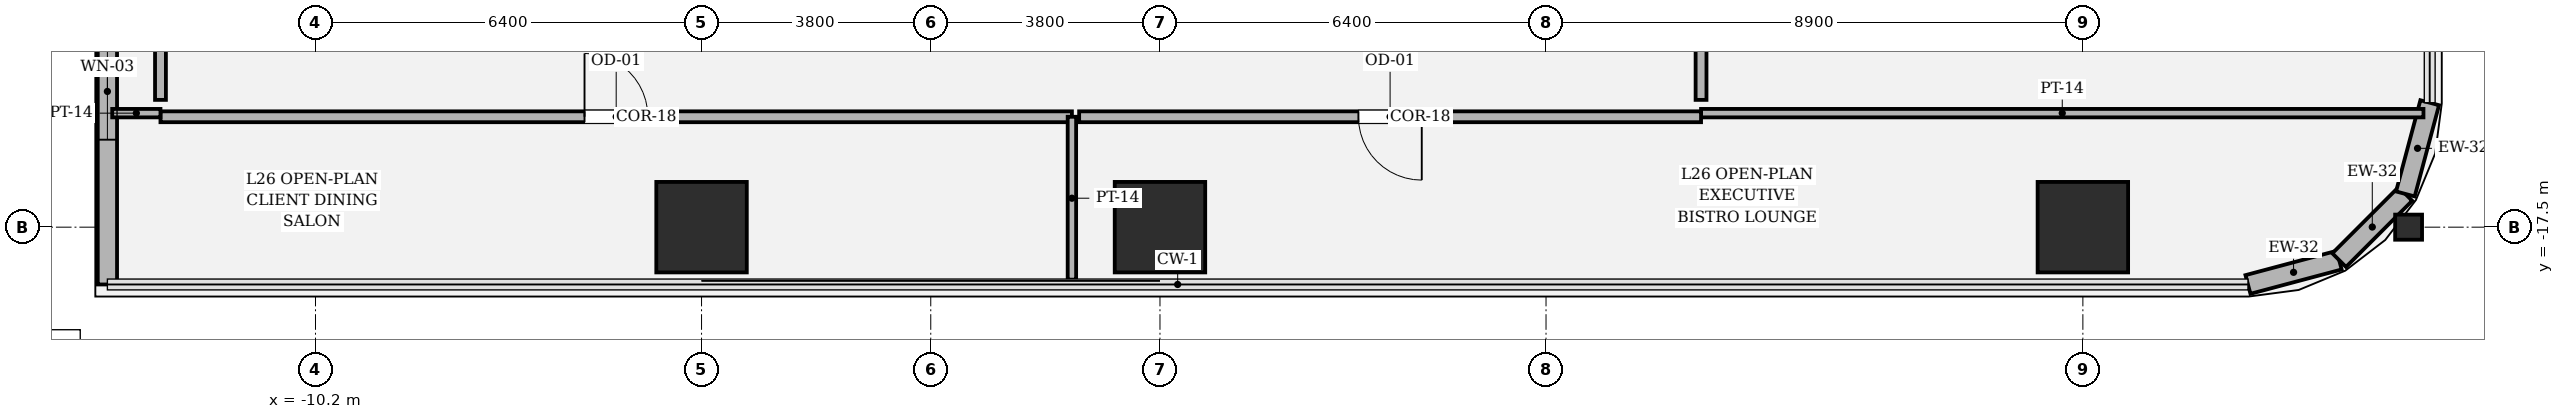
"""IFC4 building model, lengths in metres.
Left out: names, types, materials, properties, quantities, classifications, styles, units other than length and angle.
Written with IfcOpenShell. Run it as: python <this file> out.ifc"""

import sys

from ifc_helpers import new_model, si_unit, direction, frame, frame_2d, origin, origin_2d, place, context, subcontext, project, spatial, rectangle, hollow_rectangle, i_section, extrude, element, fill, save


model = new_model("IFC4")
c1 = context("Model", 3, precision=1e-05, world=origin(), true_north=direction((0.0, 1.0)))
c2 = subcontext(c1, "Body", "Model", "MODEL_VIEW")
j1 = project(units=[si_unit("LENGTHUNIT", "METRE"), si_unit("PLANEANGLEUNIT", "RADIAN")], contexts=[c1])
p1 = place(None, origin())
s1 = spatial("IfcSite", under=j1, at=p1, CompositionType="ELEMENT")
p2 = place(p1, origin())
s2 = spatial("IfcBuilding", under=s1, at=p2, CompositionType="ELEMENT")
p3 = place(p2, frame((0.0, 0.0, 113.25)))
s3 = spatial("IfcBuildingStorey", under=s2, at=p3, CompositionType="ELEMENT", Elevation=113.25)
for number, where, z_axis, x_axis in (
    (1, (-3.8, -17.5, 0.0), (0.0, 0.0, 1.0), (1.0, 0.0, 0.0)),
    (2, (3.8, -17.5, 0.0), (0.0, 0.0, 1.0), (1.0, 0.0, 0.0)),
    (3, (19.1, -17.5, 0.0), (0.0, 0.0, 1.0), (1.0, 0.0, 0.0)),
):
    element("IfcColumn", number, at=place(p3, frame(where, z_axis=z_axis, x_axis=x_axis)), inside=s3, PredefinedType="COLUMN", context=c2, shape_type="SweptSolid", body=[
        extrude(hollow_rectangle(XDim=1.5, YDim=1.5, WallThickness=0.045, at=origin_2d()), origin(), (0.0, 0.0, 1.0), 4.05),
    ])
p4 = place(p3, frame((24.5, -17.5, 0.0), z_axis=(0.0, 0.0, 1.0), x_axis=(0.0, 1.0, 0.0)))
e4 = element("IfcColumn", 4, at=p4, inside=s3, PredefinedType="COLUMN", context=c2, shape_type="SweptSolid", body=[
    extrude(i_section(OverallWidth=0.416, OverallDepth=0.446, WebThickness=0.039, FlangeThickness=0.062, FilletRadius=0.018, at=origin_2d()), origin(), (0.0, 0.0, 1.0), 4.048),
])
p5 = place(p3, frame((21.837, -18.45, 0.0), z_axis=(0.0, 0.0, 1.0), x_axis=(0.966224582397, 0.257701486942, 0.0)))
e5 = element("IfcWall", 5, at=p5, inside=s3, PredefinedType="SOLIDWALL", context=c2, shape_type="SweptSolid", body=[
    extrude(rectangle(XDim=1.565, YDim=0.32, at=frame_2d((0.783, 0.0))), origin(), (0.0, 0.0, 1.0), 3.81),
])
p6 = place(p3, frame((23.349, -18.047, 0.0), z_axis=(0.0, 0.0, 1.0), x_axis=(0.707106781187, 0.707106781187, 0.0)))
e6 = element("IfcWall", 6, at=p6, inside=s3, PredefinedType="SOLIDWALL", context=c2, shape_type="SweptSolid", body=[
    extrude(rectangle(XDim=1.552, YDim=0.32, at=frame_2d((0.776, 0.0))), origin(), (0.0, 0.0, 1.0), 2.484),
])
p7 = place(p3, frame((24.447, -16.949, 0.0), z_axis=(0.0, 0.0, 1.0), x_axis=(0.257847112249, 0.966185730957, 0.0)))
e7 = element("IfcWall", 7, at=p7, inside=s3, PredefinedType="SOLIDWALL", context=c2, shape_type="SweptSolid", body=[
    extrude(rectangle(XDim=1.565, YDim=0.32, at=frame_2d((0.783, 0.0))), origin(), (0.0, 0.0, 1.0), 2.524),
])
p8 = place(p3, frame((-13.65, -12.05, 0.0), z_axis=(0.0, 0.0, 1.0), x_axis=(0.0, -1.0, 0.0)))
e8 = element("IfcWall", 8, at=p8, inside=s3, PredefinedType="SOLIDWALL", context=c2, shape_type="SweptSolid", body=[
    extrude(rectangle(XDim=6.4, YDim=0.32, at=frame_2d((3.2, 0.0))), origin(), (0.0, 0.0, 1.0), 3.104),
])
p9 = place(p8, frame((2.4, 0.0, 0.464)))
e9 = element("IfcOpeningElement", 9, at=p9, cuts=e8, PredefinedType="OPENING", context=c2, shape_type="SweptSolid", body=[
    extrude(rectangle(XDim=1.6, YDim=2.4, at=frame_2d((0.8, 1.2))), frame((0.0, 0.17, 0.0), z_axis=(0.0, -1.0, 0.0), x_axis=(1.0, 0.0, 0.0)), (0.0, 0.0, 1.0), 0.34),
])
p10 = place(p3, frame((-12.77, -15.67, 0.0), z_axis=(0.0, 0.0, 1.0), x_axis=(1.0, 0.0, 0.0)))
e10 = element("IfcWall", 10, at=p10, inside=s3, PredefinedType="PARTITIONING", context=c2, shape_type="SweptSolid", body=[
    extrude(rectangle(XDim=15.11, YDim=0.18, at=frame_2d((7.555, 0.0))), origin(), (0.0, 0.0, 1.0), 3.104),
])
p11 = place(p10, frame((7.03, 0.0, 0.0)))
e11 = element("IfcOpeningElement", 11, at=p11, cuts=e10, PredefinedType="OPENING", context=c2, shape_type="SweptSolid", body=[
    extrude(rectangle(XDim=1.05, YDim=2.2, at=frame_2d((0.525, 1.1))), frame((0.0, 0.1, 0.0), z_axis=(0.0, -1.0, 0.0), x_axis=(1.0, 0.0, 0.0)), (0.0, 0.0, 1.0), 0.2),
])
p12 = place(p3, frame((2.34, -15.67, 0.0), z_axis=(0.0, 0.0, 1.0), x_axis=(0.0, -1.0, 0.0)))
e12 = element("IfcWall", 12, at=p12, inside=s3, PredefinedType="PARTITIONING", context=c2, shape_type="SweptSolid", body=[
    extrude(rectangle(XDim=2.7, YDim=0.14, at=frame_2d((1.35, 0.0))), origin(), (0.0, 0.0, 1.0), 3.104),
])
p13 = place(p3, frame((-13.57, -15.61, 0.0), z_axis=(0.0, 0.0, 1.0), x_axis=(1.0, 0.0, 0.0)))
e13 = element("IfcWall", 13, at=p13, inside=s3, PredefinedType="PARTITIONING", context=c2, shape_type="SweptSolid", body=[
    extrude(rectangle(XDim=0.8, YDim=0.14, at=frame_2d((0.4, 0.0))), origin(), (0.0, 0.0, 1.0), 3.81),
])
p14 = place(p3, frame((12.77, -15.61, 0.0), z_axis=(0.0, 0.0, 1.0), x_axis=(1.0, 0.0, 0.0)))
e14 = element("IfcWall", 14, at=p14, inside=s3, PredefinedType="PARTITIONING", context=c2, shape_type="SweptSolid", body=[
    extrude(rectangle(XDim=11.977, YDim=0.14, at=frame_2d((5.988, 0.0))), origin(), (0.0, 0.0, 1.0), 2.524),
])
p15 = place(p3, frame((2.46, -15.67, 0.0), z_axis=(0.0, 0.0, 1.0), x_axis=(1.0, 0.0, 0.0)))
e15 = element("IfcWall", 15, at=p15, inside=s3, PredefinedType="PARTITIONING", context=c2, shape_type="SweptSolid", body=[
    extrude(rectangle(XDim=10.31, YDim=0.18, at=frame_2d((5.155, 0.0))), origin(), (0.0, 0.0, 1.0), 3.104),
])
p16 = place(p15, frame((4.63, 0.0, 0.0)))
e16 = element("IfcOpeningElement", 16, at=p16, cuts=e15, PredefinedType="OPENING", context=c2, shape_type="SweptSolid", body=[
    extrude(rectangle(XDim=1.05, YDim=2.2, at=frame_2d((0.525, 1.1))), frame((0.0, 0.1, 0.0), z_axis=(0.0, -1.0, 0.0), x_axis=(1.0, 0.0, 0.0)), (0.0, 0.0, 1.0), 0.2),
])
for number, where, z_axis, x_axis in (
    (17, (12.77, -15.39, 0.0), (0.0, 0.0, 1.0), (0.0, 1.0, 0.0)),
    (18, (-12.77, -13.38, 0.0), (0.0, 0.0, 1.0), (0.0, -1.0, 0.0)),
):
    element("IfcWall", number, at=place(p3, frame(where, z_axis=z_axis, x_axis=x_axis)), inside=s3, PredefinedType="PARTITIONING", context=c2, shape_type="SweptSolid", body=[
        extrude(rectangle(XDim=2.01, YDim=0.18, at=frame_2d((1.005, 0.0))), origin(), (0.0, 0.0, 1.0), 3.354),
    ])
p17 = place(p9, origin())
e19 = element("IfcWindow", 19, at=p17, inside=s3, PartitioningType="SINGLE_PANEL", PredefinedType="WINDOW", context=c2, shape_type="SweptSolid", body=[
    extrude(rectangle(XDim=1.6, YDim=2.4, at=frame_2d((0.8, 1.2))), frame((0.0, 0.03, 0.0), z_axis=(0.0, -1.0, 0.0), x_axis=(1.0, 0.0, 0.0)), (0.0, 0.0, 1.0), 0.06),
])
fill(e9, e19)
p18 = place(p11, origin())
e20 = element("IfcDoor", 20, at=p18, inside=s3, OperationType="SINGLE_SWING_LEFT", PredefinedType="DOOR", context=c2, shape_type="SweptSolid", body=[
    extrude(rectangle(XDim=1.05, YDim=2.2, at=frame_2d((0.525, 1.1))), frame((0.0, 0.025, 0.0), z_axis=(0.0, -1.0, 0.0), x_axis=(1.0, 0.0, 0.0)), (0.0, 0.0, 1.0), 0.05),
])
fill(e11, e20)
p19 = place(p16, origin())
e21 = element("IfcDoor", 21, at=p19, inside=s3, OperationType="SINGLE_SWING_RIGHT", PredefinedType="DOOR", context=c2, shape_type="SweptSolid", body=[
    extrude(rectangle(XDim=1.05, YDim=2.2, at=frame_2d((0.525, 1.1))), frame((0.0, 0.025, 0.0), z_axis=(0.0, -1.0, 0.0), x_axis=(1.0, 0.0, 0.0)), (0.0, 0.0, 1.0), 0.05),
])
fill(e16, e21)
save(model, sys.argv[1])
